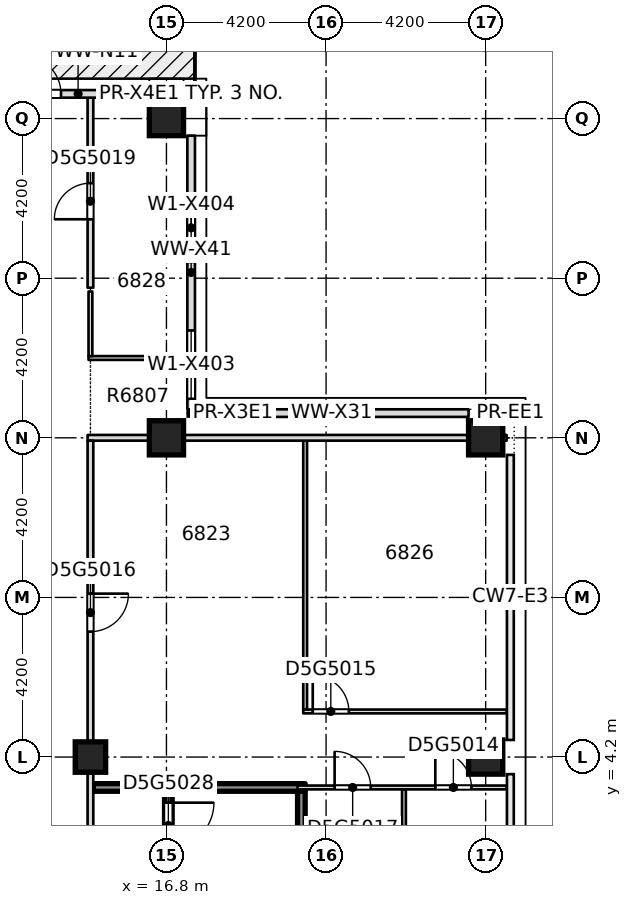
"""IFC4 building model, lengths in metres.
Left out: names, types, materials, properties, quantities, classifications, styles, units other than length and angle.
Written with IfcOpenShell. Run it as: python <this file> out.ifc"""

import sys

from ifc_helpers import new_model, si_unit, direction, frame, frame_2d, origin, origin_2d, place, context, subcontext, project, spatial, rectangle, extrude, element, fill, save


model = new_model("IFC4")
c1 = context("Model", 3, precision=1e-05, world=origin(), true_north=direction((0.0, 1.0)))
c2 = subcontext(c1, "Body", "Model", "MODEL_VIEW")
j1 = project(units=[si_unit("LENGTHUNIT", "METRE"), si_unit("PLANEANGLEUNIT", "RADIAN")], contexts=[c1])
p1 = place(None, origin())
s1 = spatial("IfcSite", under=j1, at=p1, CompositionType="ELEMENT")
p2 = place(p1, origin())
s2 = spatial("IfcBuilding", under=s1, at=p2, CompositionType="ELEMENT")
p3 = place(p2, frame((0.0, 0.0, 257.95)))
s3 = spatial("IfcBuildingStorey", under=s2, at=p3, CompositionType="ELEMENT", Elevation=257.95)
for number, where, z_axis, x_axis in (
    (1, (25.2, 4.2, -0.4), (0.0, 0.0, 1.0), (1.0, 0.0, 0.0)),
    (2, (16.8, 12.6, -0.4), (0.0, 0.0, 1.0), (1.0, 0.0, 0.0)),
    (3, (25.2, 12.6, -0.4), (0.0, 0.0, 1.0), (1.0, 0.0, 0.0)),
    (4, (16.8, 21.0, -0.4), (0.0, 0.0, 1.0), (1.0, 0.0, 0.0)),
):
    element("IfcColumn", number, at=place(p3, frame(where, z_axis=z_axis, x_axis=x_axis)), inside=s3, PredefinedType="COLUMN", context=c2, shape_type="SweptSolid", body=[
        extrude(rectangle(XDim=0.9, YDim=0.9, at=origin_2d()), origin(), (0.0, 0.0, 1.0), 3.45),
    ])
p4 = place(p3, frame((14.8, 4.2, -0.4), z_axis=(0.0, 0.0, 1.0), x_axis=(1.0, 0.0, 0.0)))
e5 = element("IfcColumn", 5, at=p4, inside=s3, PredefinedType="COLUMN", context=c2, shape_type="SweptSolid", body=[
    extrude(rectangle(XDim=0.8, YDim=0.8, at=origin_2d()), origin(), (0.0, 0.0, 1.0), 3.45),
])
p5 = place(p3, frame((14.875, 3.4, 0.0), z_axis=(0.0, 0.0, 1.0), x_axis=(1.0, 0.0, 0.0)))
e6 = element("IfcWall", 6, at=p5, inside=s3, PredefinedType="SOLIDWALL", context=c2, shape_type="SweptSolid", body=[
    extrude(rectangle(XDim=5.575, YDim=0.2, at=frame_2d((2.788, 0.0))), origin(), (0.0, 0.0, 1.0), 3.05),
])
p6 = place(p3, frame((20.25, 3.4, 0.0), z_axis=(0.0, 0.0, 1.0), x_axis=(1.0, 0.0, 0.0)))
e7 = element("IfcWall", 7, at=p6, inside=s3, PredefinedType="PARTITIONING", context=c2, shape_type="SweptSolid", body=[
    extrude(rectangle(XDim=5.5, YDim=0.1, at=frame_2d((2.75, 0.0))), origin(), (0.0, 0.0, 1.0), 3.05),
])
p7 = place(p6, frame((3.625, 0.0, 0.0)))
e8 = element("IfcOpeningElement", 8, at=p7, cuts=e7, PredefinedType="OPENING", context=c2, shape_type="SweptSolid", body=[
    extrude(rectangle(XDim=0.95, YDim=2.1, at=frame_2d((0.475, 1.05))), frame((0.0, 0.06, 0.0), z_axis=(0.0, -1.0, 0.0), x_axis=(1.0, 0.0, 0.0)), (0.0, 0.0, 1.0), 0.12),
])
p8 = place(p6, frame((0.975, 0.0, 0.0)))
e9 = element("IfcOpeningElement", 9, at=p8, cuts=e7, PredefinedType="OPENING", context=c2, shape_type="SweptSolid", body=[
    extrude(rectangle(XDim=0.95, YDim=2.1, at=frame_2d((0.475, 1.05))), frame((0.0, 0.06, 0.0), z_axis=(0.0, -1.0, 0.0), x_axis=(1.0, 0.0, 0.0)), (0.0, 0.0, 1.0), 0.12),
])
p9 = place(p3, frame((20.4, 5.4, 0.0), z_axis=(0.0, 0.0, 1.0), x_axis=(1.0, 0.0, 0.0)))
e10 = element("IfcWall", 10, at=p9, inside=s3, PredefinedType="PARTITIONING", context=c2, shape_type="SweptSolid", body=[
    extrude(rectangle(XDim=5.35, YDim=0.1, at=frame_2d((2.675, 0.0))), origin(), (0.0, 0.0, 1.0), 3.05),
])
p10 = place(p9, frame((0.25, 0.0, 0.0)))
e11 = element("IfcOpeningElement", 11, at=p10, cuts=e10, PredefinedType="OPENING", context=c2, shape_type="SweptSolid", body=[
    extrude(rectangle(XDim=0.95, YDim=2.1, at=frame_2d((0.475, 1.05))), frame((0.0, 0.06, 0.0), z_axis=(0.0, -1.0, 0.0), x_axis=(1.0, 0.0, 0.0)), (0.0, 0.0, 1.0), 0.12),
])
p11 = place(p3, frame((14.725, 12.6, 0.0), z_axis=(0.0, 0.0, 1.0), x_axis=(1.0, 0.0, 0.0)))
e12 = element("IfcWall", 12, at=p11, inside=s3, PredefinedType="PARTITIONING", context=c2, shape_type="SweptSolid", body=[
    extrude(rectangle(XDim=2.525, YDim=0.15, at=frame_2d((1.262, 0.0))), origin(), (0.0, 0.0, 1.0), 3.05),
])
p12 = place(p3, frame((14.75, 14.7, 0.0), z_axis=(0.0, 0.0, 1.0), x_axis=(1.0, 0.0, 0.0)))
e13 = element("IfcWall", 13, at=p12, inside=s3, PredefinedType="PARTITIONING", context=c2, shape_type="SweptSolid", body=[
    extrude(rectangle(XDim=2.5, YDim=0.1, at=frame_2d((1.25, 0.0))), origin(), (0.0, 0.0, 1.0), 3.05),
])
p13 = place(p3, frame((17.15, 14.7, 0.0), z_axis=(0.0, 0.0, 1.0), x_axis=(1.0, 0.0, 0.0)))
e14 = element("IfcWall", 14, at=p13, inside=s3, PredefinedType="PARTITIONING", context=c2, shape_type="SweptSolid", body=[
    extrude(rectangle(XDim=0.2, YDim=0.15, at=frame_2d((0.1, 0.0))), origin(), (0.0, 0.0, 1.0), 3.05),
])
p14 = place(p3, frame((14.8, -6.225, 0.0), z_axis=(0.0, 0.0, 1.0), x_axis=(0.0, 1.0, 0.0)))
e15 = element("IfcWall", 15, at=p14, inside=s3, PredefinedType="PARTITIONING", context=c2, shape_type="SweptSolid", body=[
    extrude(rectangle(XDim=18.75, YDim=0.15, at=frame_2d((9.375, 0.0))), origin(), (0.0, 0.0, 1.0), 3.05),
])
p15 = place(p14, frame((13.725, 0.0, 0.0)))
e16 = element("IfcOpeningElement", 16, at=p15, cuts=e15, PredefinedType="OPENING", context=c2, shape_type="SweptSolid", body=[
    extrude(rectangle(XDim=1.0, YDim=2.1, at=frame_2d((0.5, 1.05))), frame((0.0, 0.085, 0.0), z_axis=(0.0, -1.0, 0.0), x_axis=(1.0, 0.0, 0.0)), (0.0, 0.0, 1.0), 0.17),
])
p16 = place(p14, frame((5.675, 0.0, 0.0)))
e17 = element("IfcOpeningElement", 17, at=p16, cuts=e15, PredefinedType="OPENING", context=c2, shape_type="SweptSolid", body=[
    extrude(rectangle(XDim=1.1, YDim=2.1, at=frame_2d((0.55, 1.05))), frame((0.0, 0.085, 0.0), z_axis=(0.0, -1.0, 0.0), x_axis=(1.0, 0.0, 0.0)), (0.0, 0.0, 1.0), 0.17),
])
p17 = place(p3, frame((14.8, 14.75, 0.0), z_axis=(0.0, 0.0, 1.0), x_axis=(0.0, 1.0, 0.0)))
e18 = element("IfcWall", 18, at=p17, inside=s3, PredefinedType="PARTITIONING", context=c2, shape_type="SweptSolid", body=[
    extrude(rectangle(XDim=1.7, YDim=0.1, at=frame_2d((0.85, 0.0))), origin(), (0.0, 0.0, 1.0), 3.05),
])
p18 = place(p3, frame((14.8, 16.55, 0.0), z_axis=(0.0, 0.0, 1.0), x_axis=(0.0, 1.0, 0.0)))
e19 = element("IfcWall", 19, at=p18, inside=s3, PredefinedType="PARTITIONING", context=c2, shape_type="SweptSolid", body=[
    extrude(rectangle(XDim=5.0, YDim=0.15, at=frame_2d((2.5, 0.0))), origin(), (0.0, 0.0, 1.0), 3.05),
])
p19 = place(p18, frame((1.8, 0.0, 0.0)))
e20 = element("IfcOpeningElement", 20, at=p19, cuts=e19, PredefinedType="OPENING", context=c2, shape_type="SweptSolid", body=[
    extrude(rectangle(XDim=0.95, YDim=2.1, at=frame_2d((0.475, 1.05))), frame((0.0, 0.085, 0.0), z_axis=(0.0, -1.0, 0.0), x_axis=(1.0, 0.0, 0.0)), (0.0, 0.0, 1.0), 0.17),
])
p20 = place(p3, frame((16.85, -3.3, 0.0), z_axis=(0.0, 0.0, 1.0), x_axis=(0.0, 1.0, 0.0)))
e21 = element("IfcWall", 21, at=p20, inside=s3, PredefinedType="SOLIDWALL", context=c2, shape_type="SweptSolid", body=[
    extrude(rectangle(XDim=6.6, YDim=0.2, at=frame_2d((3.3, 0.0))), origin(), (0.0, 0.0, 1.0), 3.05),
])
p21 = place(p20, frame((5.1, 0.0, 0.0)))
e22 = element("IfcOpeningElement", 22, at=p21, cuts=e21, PredefinedType="OPENING", context=c2, shape_type="SweptSolid", body=[
    extrude(rectangle(XDim=1.2, YDim=2.1, at=frame_2d((0.6, 1.05))), frame((0.0, 0.11, 0.0), z_axis=(0.0, -1.0, 0.0), x_axis=(1.0, 0.0, 0.0)), (0.0, 0.0, 1.0), 0.22),
])
p22 = place(p3, frame((20.35, -3.3, 0.0), z_axis=(0.0, 0.0, 1.0), x_axis=(0.0, 1.0, 0.0)))
e23 = element("IfcWall", 23, at=p22, inside=s3, PredefinedType="SOLIDWALL", context=c2, shape_type="SweptSolid", body=[
    extrude(rectangle(XDim=6.6, YDim=0.2, at=frame_2d((3.3, 0.0))), origin(), (0.0, 0.0, 1.0), 3.05),
])
p23 = place(p3, frame((20.45, 5.45, 0.0), z_axis=(0.0, 0.0, 1.0), x_axis=(0.0, 1.0, 0.0)))
e24 = element("IfcWall", 24, at=p23, inside=s3, PredefinedType="PARTITIONING", context=c2, shape_type="SweptSolid", body=[
    extrude(rectangle(XDim=7.075, YDim=0.1, at=frame_2d((3.538, 0.0))), origin(), (0.0, 0.0, 1.0), 3.05),
])
p24 = place(p3, frame((23.05, -3.3, 0.0), z_axis=(0.0, 0.0, 1.0), x_axis=(0.0, 1.0, 0.0)))
e25 = element("IfcWall", 25, at=p24, inside=s3, PredefinedType="PARTITIONING", context=c2, shape_type="SweptSolid", body=[
    extrude(rectangle(XDim=6.65, YDim=0.1, at=frame_2d((3.325, 0.0))), origin(), (0.0, 0.0, 1.0), 3.05),
])
p25 = place(p3, frame((24.75, 13.25, 0.0), z_axis=(0.0, 0.0, 1.0), x_axis=(-1.0, 0.0, 0.0)))
e26 = element("IfcWall", 26, at=p25, inside=s3, PredefinedType="STANDARD", context=c2, shape_type="SweptSolid", body=[
    extrude(rectangle(XDim=7.2, YDim=0.2, at=frame_2d((3.6, 0.0))), origin(), (0.0, 0.0, 1.0), 3.05),
])
p26 = place(p3, frame((17.45, 13.35, 0.0), z_axis=(0.0, 0.0, 1.0), x_axis=(0.0, 1.0, 0.0)))
e27 = element("IfcWall", 27, at=p26, inside=s3, PredefinedType="STANDARD", context=c2, shape_type="SweptSolid", body=[
    extrude(rectangle(XDim=7.2, YDim=0.2, at=frame_2d((3.6, 0.0))), origin(), (0.0, 0.0, 1.0), 3.05),
])
p27 = place(p26, frame((0.275, 0.0, 0.2)))
e28 = element("IfcOpeningElement", 28, at=p27, cuts=e27, PredefinedType="OPENING", context=c2, shape_type="SweptSolid", body=[
    extrude(rectangle(XDim=1.8, YDim=2.65, at=frame_2d((0.9, 1.325))), frame((0.0, 0.11, 0.0), z_axis=(0.0, -1.0, 0.0), x_axis=(1.0, 0.0, 0.0)), (0.0, 0.0, 1.0), 0.22),
])
p28 = place(p26, frame((3.875, 0.0, 0.2)))
e29 = element("IfcOpeningElement", 29, at=p28, cuts=e27, PredefinedType="OPENING", context=c2, shape_type="SweptSolid", body=[
    extrude(rectangle(XDim=1.8, YDim=2.65, at=frame_2d((0.9, 1.325))), frame((0.0, 0.11, 0.0), z_axis=(0.0, -1.0, 0.0), x_axis=(1.0, 0.0, 0.0)), (0.0, 0.0, 1.0), 0.22),
])
p29 = place(p3, frame((16.35, 21.65, 0.0), z_axis=(0.0, 0.0, 1.0), x_axis=(-1.0, 0.0, 0.0)))
e30 = element("IfcWall", 30, at=p29, inside=s3, PredefinedType="STANDARD", context=c2, shape_type="SweptSolid", body=[
    extrude(rectangle(XDim=3.75, YDim=0.2, at=frame_2d((1.875, 0.0))), origin(), (0.0, 0.0, 1.0), 3.05),
])
p30 = place(p29, frame((2.325, 0.0, 0.0)))
e31 = element("IfcOpeningElement", 31, at=p30, cuts=e30, PredefinedType="OPENING", context=c2, shape_type="SweptSolid", body=[
    extrude(rectangle(XDim=1.0, YDim=2.4, at=frame_2d((0.5, 1.2))), frame((0.0, 0.11, 0.0), z_axis=(0.0, -1.0, 0.0), x_axis=(1.0, 0.0, 0.0)), (0.0, 0.0, 1.0), 0.22),
])
p31 = place(p3, frame((17.25, 12.6, 0.0), z_axis=(0.0, 0.0, 1.0), x_axis=(1.0, 0.0, 0.0)))
e32 = element("IfcWall", 32, at=p31, inside=s3, PredefinedType="PARTITIONING", context=c2, shape_type="SweptSolid", body=[
    extrude(rectangle(XDim=7.5, YDim=0.15, at=frame_2d((3.75, 0.0))), origin(), (0.0, 0.0, 1.0), 2.5),
])
p32 = place(p3, frame((24.75, 12.6, 0.0), z_axis=(0.0, 0.0, 1.0), x_axis=(1.0, 0.0, 0.0)))
e33 = element("IfcWall", 33, at=p32, inside=s3, PredefinedType="PARTITIONING", context=c2, shape_type="SweptSolid", body=[
    extrude(rectangle(XDim=1.0, YDim=0.15, at=frame_2d((0.5, 0.0))), origin(), (0.0, 0.0, 1.0), 3.05),
])
p33 = place(p7, origin())
e34 = element("IfcDoor", 34, at=p33, inside=s3, OperationType="SINGLE_SWING_LEFT", PredefinedType="DOOR", context=c2, shape_type="SweptSolid", body=[
    extrude(rectangle(XDim=0.95, YDim=2.1, at=frame_2d((0.475, 1.05))), frame((0.0, 0.025, 0.0), z_axis=(0.0, -1.0, 0.0), x_axis=(1.0, 0.0, 0.0)), (0.0, 0.0, 1.0), 0.05),
])
fill(e8, e34)
p34 = place(p10, origin())
e35 = element("IfcDoor", 35, at=p34, inside=s3, OperationType="SINGLE_SWING_LEFT", PredefinedType="DOOR", context=c2, shape_type="SweptSolid", body=[
    extrude(rectangle(XDim=0.95, YDim=2.1, at=frame_2d((0.475, 1.05))), frame((0.0, 0.025, 0.0), z_axis=(0.0, -1.0, 0.0), x_axis=(1.0, 0.0, 0.0)), (0.0, 0.0, 1.0), 0.05),
])
fill(e11, e35)
p35 = place(p15, origin())
e36 = element("IfcDoor", 36, at=p35, inside=s3, OperationType="SINGLE_SWING_RIGHT", PredefinedType="DOOR", context=c2, shape_type="SweptSolid", body=[
    extrude(rectangle(XDim=1.0, YDim=2.1, at=frame_2d((0.5, 1.05))), frame((0.0, 0.025, 0.0), z_axis=(0.0, -1.0, 0.0), x_axis=(1.0, 0.0, 0.0)), (0.0, 0.0, 1.0), 0.05),
])
fill(e16, e36)
p36 = place(p8, origin())
e37 = element("IfcDoor", 37, at=p36, inside=s3, OperationType="SINGLE_SWING_RIGHT", PredefinedType="DOOR", context=c2, shape_type="SweptSolid", body=[
    extrude(rectangle(XDim=0.95, YDim=2.1, at=frame_2d((0.475, 1.05))), frame((0.0, 0.025, 0.0), z_axis=(0.0, -1.0, 0.0), x_axis=(1.0, 0.0, 0.0)), (0.0, 0.0, 1.0), 0.05),
])
fill(e9, e37)
p37 = place(p19, origin())
e38 = element("IfcDoor", 38, at=p37, inside=s3, OperationType="SINGLE_SWING_LEFT", PredefinedType="DOOR", context=c2, shape_type="SweptSolid", body=[
    extrude(rectangle(XDim=0.95, YDim=2.1, at=frame_2d((0.475, 1.05))), frame((0.0, 0.025, 0.0), z_axis=(0.0, -1.0, 0.0), x_axis=(1.0, 0.0, 0.0)), (0.0, 0.0, 1.0), 0.05),
])
fill(e20, e38)
p38 = place(p21, origin())
e39 = element("IfcDoor", 39, at=p38, inside=s3, OperationType="SINGLE_SWING_LEFT", PredefinedType="DOOR", context=c2, shape_type="SweptSolid", body=[
    extrude(rectangle(XDim=1.2, YDim=2.1, at=frame_2d((0.6, 1.05))), frame((0.0, 0.025, 0.0), z_axis=(0.0, -1.0, 0.0), x_axis=(1.0, 0.0, 0.0)), (0.0, 0.0, 1.0), 0.05),
])
fill(e22, e39)
p39 = place(p27, origin())
e40 = element("IfcWindow", 40, at=p39, inside=s3, PartitioningType="SINGLE_PANEL", PredefinedType="WINDOW", context=c2, shape_type="SweptSolid", body=[
    extrude(rectangle(XDim=1.8, YDim=2.65, at=frame_2d((0.9, 1.325))), frame((0.0, 0.03, 0.0), z_axis=(0.0, -1.0, 0.0), x_axis=(1.0, 0.0, 0.0)), (0.0, 0.0, 1.0), 0.06),
])
fill(e28, e40)
p40 = place(p28, origin())
e41 = element("IfcWindow", 41, at=p40, inside=s3, PartitioningType="SINGLE_PANEL", PredefinedType="WINDOW", context=c2, shape_type="SweptSolid", body=[
    extrude(rectangle(XDim=1.8, YDim=2.65, at=frame_2d((0.9, 1.325))), frame((0.0, 0.03, 0.0), z_axis=(0.0, -1.0, 0.0), x_axis=(1.0, 0.0, 0.0)), (0.0, 0.0, 1.0), 0.06),
])
fill(e29, e41)
p41 = place(p30, origin())
e42 = element("IfcDoor", 42, at=p41, inside=s3, OperationType="SINGLE_SWING_LEFT", PredefinedType="DOOR", context=c2, shape_type="SweptSolid", body=[
    extrude(rectangle(XDim=1.0, YDim=2.4, at=frame_2d((0.5, 1.2))), frame((0.0, 0.025, 0.0), z_axis=(0.0, -1.0, 0.0), x_axis=(1.0, 0.0, 0.0)), (0.0, 0.0, 1.0), 0.05),
])
fill(e31, e42)
save(model, sys.argv[1])
